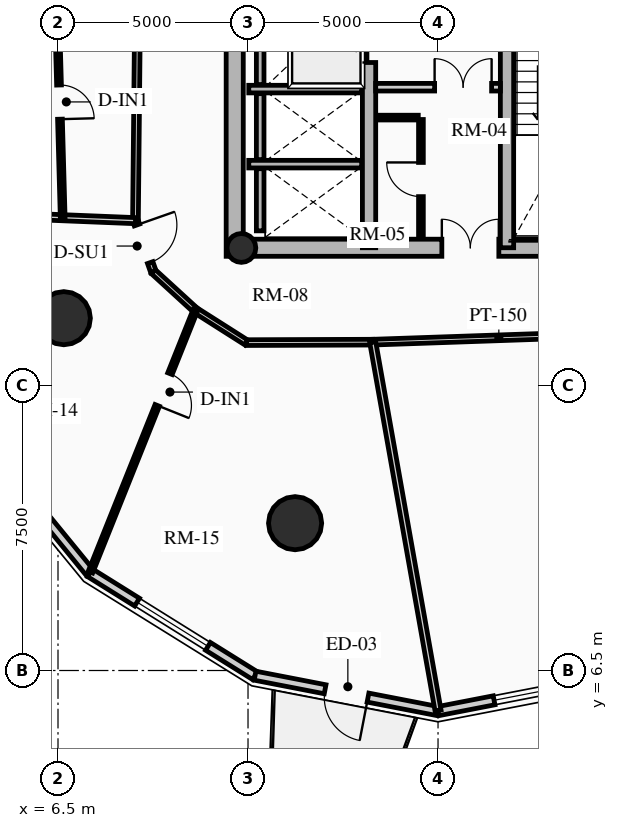
"""IFC4 building model, lengths in metres.
Left out: names, types, materials, properties, quantities, classifications, styles, units other than length and angle.
Written with IfcOpenShell. Run it as: python <this file> out.ifc"""

import sys

from ifc_helpers import new_model, si_unit, direction, frame, frame_2d, origin, origin_2d, place, context, subcontext, project, spatial, rectangle, circle, hollow_circle, extrude, source, transform, mapped, element, fill, save


model = new_model("IFC4")
c1 = context("Model", 3, precision=1e-05, world=origin(), true_north=direction((0.0, 1.0)))
c2 = subcontext(c1, "Body", "Model", "MODEL_VIEW")
j1 = project(units=[si_unit("LENGTHUNIT", "METRE"), si_unit("PLANEANGLEUNIT", "RADIAN")], contexts=[c1])
p1 = place(None, origin())
s1 = spatial("IfcSite", under=j1, at=p1, CompositionType="ELEMENT")
p2 = place(p1, origin())
s2 = spatial("IfcBuilding", under=s1, at=p2, CompositionType="ELEMENT")
p3 = place(p2, frame((0.0, 0.0, 119.62)))
s3 = spatial("IfcBuildingStorey", under=s2, at=p3, CompositionType="ELEMENT", Elevation=119.62)
p4 = place(p3, frame((11.15, 17.4, 0.0), z_axis=(0.0, 0.0, 1.0), x_axis=(0.0, 1.0, 0.0)))
e1 = element("IfcWall", 1, at=p4, inside=s3, PredefinedType="SHEAR", context=c2, shape_type="SweptSolid", body=[
    extrude(rectangle(XDim=14.2, YDim=0.45, at=frame_2d((7.1, 0.0))), origin(), (0.0, 0.0, 1.0), 2.91),
])
p5 = place(p3, frame((11.15, 17.625, 0.0), z_axis=(0.0, 0.0, 1.0), x_axis=(1.0, 0.0, 0.0)))
e2 = element("IfcWall", 2, at=p5, inside=s3, PredefinedType="SHEAR", context=c2, shape_type="SweptSolid", body=[
    extrude(rectangle(XDim=10.7, YDim=0.45, at=frame_2d((5.35, 0.0))), origin(), (0.0, 0.0, 1.0), 2.91),
])
m1 = source(origin(), c2, "Body", "SweptSolid", [
    extrude(rectangle(XDim=1.5, YDim=2.02, at=frame_2d((0.75, 1.01))), frame((0.0, 0.235, 0.0), z_axis=(0.0, -1.0, 0.0), x_axis=(1.0, 0.0, 0.0)), (0.0, 0.0, 1.0), 0.47),
])
p6 = place(p5, frame((5.45, 0.0, 0.0)))
e3 = element("IfcOpeningElement", 3, at=p6, cuts=e2, PredefinedType="OPENING", context=c2, shape_type="MappedRepresentation", body=[
    mapped(m1, transform((0.0, 0.0, 0.0), x_axis=(1.0, 0.0, 0.0), y_axis=(0.0, 1.0, 0.0), z_axis=(0.0, 0.0, 1.0), scale=1.0)),
])
p7 = place(p3, frame((14.685, 17.625, 0.0), z_axis=(0.0, 0.0, 1.0), x_axis=(0.0, 1.0, 0.0)))
e4 = element("IfcWall", 4, at=p7, inside=s3, PredefinedType="SHEAR", context=c2, shape_type="SweptSolid", body=[
    extrude(rectangle(XDim=13.75, YDim=0.35, at=frame_2d((6.875, 0.0))), origin(), (0.0, 0.0, 1.0), 2.91),
])
m2 = source(origin(), c2, "Body", "SweptSolid", [
    extrude(rectangle(XDim=1.1, YDim=2.015, at=frame_2d((0.55, 1.007))), frame((0.0, 0.185, 0.0), z_axis=(0.0, -1.0, 0.0), x_axis=(1.0, 0.0, 0.0)), (0.0, 0.0, 1.0), 0.37),
])
p8 = place(p7, frame((4.875, 0.0, 0.0)))
e5 = element("IfcOpeningElement", 5, at=p8, cuts=e4, PredefinedType="OPENING", context=c2, shape_type="MappedRepresentation", body=[
    mapped(m2, transform((0.0, 0.0, 0.0), x_axis=(1.0, 0.0, 0.0), y_axis=(0.0, 1.0, 0.0), z_axis=(0.0, 0.0, 1.0), scale=1.0)),
])
m3 = source(origin(), c2, "Body", "SweptSolid", [
    extrude(rectangle(XDim=1.15, YDim=2.02, at=frame_2d((0.575, 1.01))), frame((0.0, 0.185, 0.0), z_axis=(0.0, -1.0, 0.0), x_axis=(1.0, 0.0, 0.0)), (0.0, 0.0, 1.0), 0.37),
])
p9 = place(p7, frame((7.295, 0.0, 0.0)))
e6 = element("IfcOpeningElement", 6, at=p9, cuts=e4, PredefinedType="OPENING", context=c2, shape_type="MappedRepresentation", body=[
    mapped(m3, transform((0.0, 0.0, 0.0), x_axis=(1.0, 0.0, 0.0), y_axis=(0.0, 1.0, 0.0), z_axis=(0.0, 0.0, 1.0), scale=1.0)),
])
p10 = place(p3, frame((18.315, 17.625, 0.0), z_axis=(0.0, 0.0, 1.0), x_axis=(0.0, 1.0, 0.0)))
e7 = element("IfcWall", 7, at=p10, inside=s3, PredefinedType="SHEAR", context=c2, shape_type="SweptSolid", body=[
    extrude(rectangle(XDim=13.75, YDim=0.35, at=frame_2d((6.875, 0.0))), origin(), (0.0, 0.0, 1.0), 2.91),
])
p11 = place(p10, frame((10.0, 0.0, 0.0)))
e8 = element("IfcOpeningElement", 8, at=p11, cuts=e7, PredefinedType="OPENING", context=c2, shape_type="MappedRepresentation", body=[
    mapped(m2, transform((0.0, 0.0, 0.0), x_axis=(1.0, 0.0, 0.0), y_axis=(0.0, 1.0, 0.0), z_axis=(0.0, 0.0, 1.0), scale=1.0)),
])
p12 = place(p10, frame((12.0, 0.0, 0.0)))
e9 = element("IfcOpeningElement", 9, at=p12, cuts=e7, PredefinedType="OPENING", context=c2, shape_type="MappedRepresentation", body=[
    mapped(m2, transform((0.0, 0.0, 0.0), x_axis=(1.0, 0.0, 0.0), y_axis=(0.0, 1.0, 0.0), z_axis=(0.0, 0.0, 1.0), scale=1.0)),
])
p13 = place(p10, frame((5.305, 0.0, 0.0)))
e10 = element("IfcOpeningElement", 10, at=p13, cuts=e7, PredefinedType="OPENING", context=c2, shape_type="MappedRepresentation", body=[
    mapped(m3, transform((0.0, 0.0, 0.0), x_axis=(1.0, 0.0, 0.0), y_axis=(0.0, 1.0, 0.0), z_axis=(0.0, 0.0, 1.0), scale=1.0)),
])
p14 = place(p3, frame((11.325, 17.62, 0.0), z_axis=(0.0, 0.0, 1.0), x_axis=(1.0, 0.0, 0.0)))
e11 = element("IfcColumn", 11, at=p14, inside=s3, PredefinedType="COLUMN", context=c2, shape_type="SweptSolid", body=[
    extrude(hollow_circle(Radius=0.38, WallThickness=0.032, at=origin_2d()), origin(), (0.0, 0.0, 1.0), 2.91),
])
for number, where, z_axis, x_axis in (
    (12, (6.653, 15.771, 0.0), (0.0, 0.0, 1.0), (1.0, 0.0, 0.0)),
    (13, (12.739, 10.377, 0.0), (0.0, 0.0, 1.0), (1.0, 0.0, 0.0)),
):
    element("IfcColumn", number, at=place(p3, frame(where, z_axis=z_axis, x_axis=x_axis)), inside=s3, PredefinedType="USERDEFINED", context=c2, shape_type="SweptSolid", body=[
        extrude(circle(Radius=0.7, at=origin_2d()), origin(), (0.0, 0.0, 1.0), 2.91),
    ])
p15 = place(p3, frame((7.342, 9.072, 0.0), z_axis=(0.0, 0.0, 1.0), x_axis=(-0.632700781152, 0.77439635945, 0.0)))
e14 = element("IfcWall", 14, at=p15, inside=s3, PredefinedType="SOLIDWALL", context=c2, shape_type="SweptSolid", body=[
    extrude(rectangle(XDim=5.448, YDim=0.24, at=frame_2d((2.724, 0.0))), origin(), (0.0, 0.0, 1.0), 2.179),
])
p16 = place(p3, frame((11.685, 6.363, 0.0), z_axis=(0.0, 0.0, 1.0), x_axis=(-0.848520380187, 0.529162701263, 0.0)))
e15 = element("IfcWall", 15, at=p16, inside=s3, PredefinedType="SOLIDWALL", context=c2, shape_type="SweptSolid", body=[
    extrude(rectangle(XDim=5.119, YDim=0.24, at=frame_2d((2.56, 0.0))), origin(), (0.0, 0.0, 1.0), 2.179),
])
m4 = source(origin(), c2, "Body", "SweptSolid", [
    extrude(rectangle(XDim=2.2, YDim=1.35, at=frame_2d((1.1, 0.675))), frame((0.0, 0.13, 0.0), z_axis=(0.0, -1.0, 0.0), x_axis=(1.0, 0.0, 0.0)), (0.0, 0.0, 1.0), 0.26),
])
p17 = place(p16, frame((1.459, 0.0, 0.65)))
e16 = element("IfcOpeningElement", 16, at=p17, cuts=e15, PredefinedType="OPENING", context=c2, shape_type="MappedRepresentation", body=[
    mapped(m4, transform((0.0, 0.0, 0.0), x_axis=(1.0, 0.0, 0.0), y_axis=(0.0, 1.0, 0.0), z_axis=(0.0, 0.0, 1.0), scale=1.0)),
])
p18 = place(p3, frame((16.5, 5.43, 0.0), z_axis=(0.0, 0.0, 1.0), x_axis=(-0.981723785992, 0.190311344954, 0.0)))
e17 = element("IfcWall", 17, at=p18, inside=s3, PredefinedType="SOLIDWALL", context=c2, shape_type="SweptSolid", body=[
    extrude(rectangle(XDim=4.904, YDim=0.24, at=frame_2d((2.452, 0.0))), origin(), (0.0, 0.0, 1.0), 2.179),
])
m5 = source(origin(), c2, "Body", "SweptSolid", [
    extrude(rectangle(XDim=1.15, YDim=2.005, at=frame_2d((0.575, 1.002))), frame((0.0, 0.13, 0.0), z_axis=(0.0, -1.0, 0.0), x_axis=(1.0, 0.0, 0.0)), (0.0, 0.0, 1.0), 0.26),
])
p19 = place(p18, frame((1.877, 0.0, 0.0)))
e18 = element("IfcOpeningElement", 18, at=p19, cuts=e17, PredefinedType="OPENING", context=c2, shape_type="MappedRepresentation", body=[
    mapped(m5, transform((0.0, 0.0, 0.0), x_axis=(1.0, 0.0, 0.0), y_axis=(0.0, 1.0, 0.0), z_axis=(0.0, 0.0, 1.0), scale=1.0)),
])
p20 = place(p3, frame((21.315, 6.363, 0.0), z_axis=(0.0, 0.0, 1.0), x_axis=(-0.981723785992, -0.190311344954, 0.0)))
e19 = element("IfcWall", 19, at=p20, inside=s3, PredefinedType="SOLIDWALL", context=c2, shape_type="SweptSolid", body=[
    extrude(rectangle(XDim=4.904, YDim=0.24, at=frame_2d((2.452, 0.0))), origin(), (0.0, 0.0, 1.0), 2.179),
])
m6 = source(origin(), c2, "Body", "SweptSolid", [
    extrude(rectangle(XDim=1.9, YDim=1.35, at=frame_2d((0.95, 0.675))), frame((0.0, 0.13, 0.0), z_axis=(0.0, -1.0, 0.0), x_axis=(1.0, 0.0, 0.0)), (0.0, 0.0, 1.0), 0.26),
])
p21 = place(p20, frame((1.502, 0.0, 0.65)))
e20 = element("IfcOpeningElement", 20, at=p21, cuts=e19, PredefinedType="OPENING", context=c2, shape_type="MappedRepresentation", body=[
    mapped(m6, transform((0.0, 0.0, 0.0), x_axis=(1.0, 0.0, 0.0), y_axis=(0.0, 1.0, 0.0), z_axis=(0.0, 0.0, 1.0), scale=1.0)),
])
p22 = place(p3, frame((11.52, 21.8, 0.0), z_axis=(0.0, 0.0, 1.0), x_axis=(1.0, 0.0, 0.0)))
e21 = element("IfcWall", 21, at=p22, inside=s3, PredefinedType="SHEAR", context=c2, shape_type="SweptSolid", body=[
    extrude(rectangle(XDim=2.97, YDim=0.2, at=frame_2d((1.485, 0.0))), origin(), (0.0, 0.0, 1.0), 2.91),
])
p23 = place(p3, frame((11.82, 21.92, 0.0), z_axis=(0.0, 0.0, 1.0), x_axis=(0.0, 1.0, 0.0)))
e22 = element("IfcWall", 22, at=p23, inside=s3, PredefinedType="SHEAR", context=c2, shape_type="SweptSolid", body=[
    extrude(rectangle(XDim=2.44, YDim=0.2, at=frame_2d((1.22, 0.0))), origin(), (0.0, 0.0, 1.0), 2.91),
])
p24 = place(p3, frame((11.52, 19.825, 0.0), z_axis=(0.0, 0.0, 1.0), x_axis=(1.0, 0.0, 0.0)))
e23 = element("IfcWall", 23, at=p24, inside=s3, PredefinedType="SHEAR", context=c2, shape_type="SweptSolid", body=[
    extrude(rectangle(XDim=2.97, YDim=0.2, at=frame_2d((1.485, 0.0))), origin(), (0.0, 0.0, 1.0), 2.91),
])
p25 = place(p3, frame((11.82, 19.945, 0.0), z_axis=(0.0, 0.0, 1.0), x_axis=(0.0, 1.0, 0.0)))
e24 = element("IfcWall", 24, at=p25, inside=s3, PredefinedType="SHEAR", context=c2, shape_type="SweptSolid", body=[
    extrude(rectangle(XDim=1.735, YDim=0.2, at=frame_2d((0.867, 0.0))), origin(), (0.0, 0.0, 1.0), 2.91),
])
p26 = place(p3, frame((11.82, 18.07, 0.0), z_axis=(0.0, 0.0, 1.0), x_axis=(0.0, 1.0, 0.0)))
e25 = element("IfcWall", 25, at=p26, inside=s3, PredefinedType="SHEAR", context=c2, shape_type="SweptSolid", body=[
    extrude(rectangle(XDim=1.635, YDim=0.2, at=frame_2d((0.817, 0.0))), origin(), (0.0, 0.0, 1.0), 2.91),
])
p27 = place(p3, frame((14.86, 21.85, 0.0), z_axis=(0.0, 0.0, 1.0), x_axis=(1.0, 0.0, 0.0)))
e26 = element("IfcWall", 26, at=p27, inside=s3, PredefinedType="PARTITIONING", context=c2, shape_type="SweptSolid", body=[
    extrude(rectangle(XDim=3.28, YDim=0.2, at=frame_2d((1.64, 0.0))), origin(), (0.0, 0.0, 1.0), 2.655),
])
m7 = source(origin(), c2, "Body", "SweptSolid", [
    extrude(rectangle(XDim=1.5, YDim=2.02, at=frame_2d((0.75, 1.01))), frame((0.0, 0.11, 0.0), z_axis=(0.0, -1.0, 0.0), x_axis=(1.0, 0.0, 0.0)), (0.0, 0.0, 1.0), 0.22),
])
p28 = place(p27, frame((1.55, 0.0, 0.0)))
e27 = element("IfcOpeningElement", 27, at=p28, cuts=e26, PredefinedType="OPENING", context=c2, shape_type="MappedRepresentation", body=[
    mapped(m7, transform((0.0, 0.0, 0.0), x_axis=(1.0, 0.0, 0.0), y_axis=(0.0, 1.0, 0.0), z_axis=(0.0, 0.0, 1.0), scale=1.0)),
])
p29 = place(p3, frame((16.05, 17.92, 0.0), z_axis=(0.0, 0.0, 1.0), x_axis=(0.0, 1.0, 0.0)))
e28 = element("IfcWall", 28, at=p29, inside=s3, PredefinedType="PARTITIONING", context=c2, shape_type="SweptSolid", body=[
    extrude(rectangle(XDim=3.08, YDim=0.125, at=frame_2d((1.54, 0.0))), origin(), (0.0, 0.0, 1.0), 2.655),
])
m8 = source(origin(), c2, "Body", "SweptSolid", [
    extrude(rectangle(XDim=0.9, YDim=2.005, at=frame_2d((0.45, 1.002))), frame((0.0, 0.073, 0.0), z_axis=(0.0, -1.0, 0.0), x_axis=(1.0, 0.0, 0.0)), (0.0, 0.0, 1.0), 0.145),
])
p30 = place(p29, frame((1.05, 0.0, 0.0)))
e29 = element("IfcOpeningElement", 29, at=p30, cuts=e28, PredefinedType="OPENING", context=c2, shape_type="MappedRepresentation", body=[
    mapped(m8, transform((0.0, 0.0, 0.0), x_axis=(1.0, 0.0, 0.0), y_axis=(0.0, 1.0, 0.0), z_axis=(0.0, 0.0, 1.0), scale=1.0)),
])
p31 = place(p3, frame((14.88, 21.05, 0.0), z_axis=(0.0, 0.0, 1.0), x_axis=(1.0, 0.0, 0.0)))
e30 = element("IfcWall", 30, at=p31, inside=s3, PredefinedType="PARTITIONING", context=c2, shape_type="SweptSolid", body=[
    extrude(rectangle(XDim=1.1, YDim=0.125, at=frame_2d((0.55, 0.0))), origin(), (0.0, 0.0, 1.0), 2.655),
])
p32 = place(p3, frame((8.6, 24.5, 0.0), z_axis=(0.0, 0.0, 1.0), x_axis=(-0.010023665349, -0.999949761805, 0.0)))
e31 = element("IfcWall", 31, at=p32, inside=s3, PredefinedType="PARTITIONING", context=c2, shape_type="SweptSolid", body=[
    extrude(rectangle(XDim=6.162, YDim=0.15, at=frame_2d((3.081, 0.0))), origin(), (0.0, 0.0, 1.0), 2.225),
])
p33 = place(p3, frame((8.538, 18.338, 0.0), z_axis=(0.0, 0.0, 1.0), x_axis=(0.331358150167, -0.94350504838, 0.0)))
e32 = element("IfcWall", 32, at=p33, inside=s3, PredefinedType="PARTITIONING", context=c2, shape_type="SweptSolid", body=[
    extrude(rectangle(XDim=1.424, YDim=0.15, at=frame_2d((0.712, 0.0))), origin(), (0.0, 0.0, 1.0), 2.225),
])
m9 = source(origin(), c2, "Body", "SweptSolid", [
    extrude(rectangle(XDim=1.05, YDim=2.015, at=frame_2d((0.525, 1.007))), frame((0.0, 0.085, 0.0), z_axis=(0.0, -1.0, 0.0), x_axis=(1.0, 0.0, 0.0)), (0.0, 0.0, 1.0), 0.17),
])
p34 = place(p33, frame((0.12, 0.0, 0.0)))
e33 = element("IfcOpeningElement", 33, at=p34, cuts=e32, PredefinedType="OPENING", context=c2, shape_type="MappedRepresentation", body=[
    mapped(m9, transform((0.0, 0.0, 0.0), x_axis=(1.0, 0.0, 0.0), y_axis=(0.0, 1.0, 0.0), z_axis=(0.0, 0.0, 1.0), scale=1.0)),
])
p35 = place(p3, frame((9.01, 16.994, 0.0), z_axis=(0.0, 0.0, 1.0), x_axis=(0.737701798986, -0.67512669609, 0.0)))
e34 = element("IfcWall", 34, at=p35, inside=s3, PredefinedType="PARTITIONING", context=c2, shape_type="SweptSolid", body=[
    extrude(rectangle(XDim=1.498, YDim=0.15, at=frame_2d((0.749, 0.0))), origin(), (0.0, 0.0, 1.0), 2.225),
])
p36 = place(p3, frame((10.115, 15.983, 0.0), z_axis=(0.0, 0.0, 1.0), x_axis=(0.843995849351, -0.536349705209, 0.0)))
e35 = element("IfcWall", 35, at=p36, inside=s3, PredefinedType="PARTITIONING", context=c2, shape_type="SweptSolid", body=[
    extrude(rectangle(XDim=1.593, YDim=0.15, at=frame_2d((0.796, 0.0))), origin(), (0.0, 0.0, 1.0), 2.225),
])
p37 = place(p3, frame((11.46, 15.129, 0.0), z_axis=(0.0, 0.0, 1.0), x_axis=(0.999993513287, 0.003601858435, 0.0)))
e36 = element("IfcWall", 36, at=p37, inside=s3, PredefinedType="PARTITIONING", context=c2, shape_type="SweptSolid", body=[
    extrude(rectangle(XDim=3.321, YDim=0.15, at=frame_2d((1.661, 0.0))), origin(), (0.0, 0.0, 1.0), 2.225),
])
p38 = place(p3, frame((14.781, 15.141, 0.0), z_axis=(0.0, 0.0, 1.0), x_axis=(0.999407918707, 0.034406569513, 0.0)))
e37 = element("IfcWall", 37, at=p38, inside=s3, PredefinedType="PARTITIONING", context=c2, shape_type="SweptSolid", body=[
    extrude(rectangle(XDim=6.642, YDim=0.15, at=frame_2d((3.321, 0.0))), origin(), (0.0, 0.0, 1.0), 2.225),
])
p39 = place(p3, frame((8.538, 18.338, 0.0), z_axis=(0.0, 0.0, 1.0), x_axis=(-0.999191355531, 0.04020740021, 0.0)))
e38 = element("IfcWall", 38, at=p39, inside=s3, PredefinedType="PARTITIONING", context=c2, shape_type="SweptSolid", body=[
    extrude(rectangle(XDim=6.843, YDim=0.16, at=frame_2d((3.422, 0.0))), origin(), (0.0, 0.0, 1.0), 2.179),
])
p40 = place(p3, frame((14.781, 15.141, 0.0), z_axis=(0.0, 0.0, 1.0), x_axis=(0.174659805548, -0.984628839881, 0.0)))
e39 = element("IfcWall", 39, at=p40, inside=s3, PredefinedType="PARTITIONING", context=c2, shape_type="SweptSolid", body=[
    extrude(rectangle(XDim=9.842, YDim=0.16, at=frame_2d((4.921, 0.0))), origin(), (0.0, 0.0, 1.0), 2.179),
])
p41 = place(p3, frame((6.455, 24.5, 0.0), z_axis=(0.0, 0.0, 1.0), x_axis=(0.027753708707, -0.999614791634, 0.0)))
e40 = element("IfcWall", 40, at=p41, inside=s3, PredefinedType="PARTITIONING", context=c2, shape_type="SweptSolid", body=[
    extrude(rectangle(XDim=6.087, YDim=0.125, at=frame_2d((3.044, 0.0))), origin(), (0.0, 0.0, 1.0), 2.225),
])
p42 = place(p41, frame((2.594, 0.0, 0.0)))
e41 = element("IfcOpeningElement", 41, at=p42, cuts=e40, PredefinedType="OPENING", context=c2, shape_type="MappedRepresentation", body=[
    mapped(m8, transform((0.0, 0.0, 0.0), x_axis=(1.0, 0.0, 0.0), y_axis=(0.0, 1.0, 0.0), z_axis=(0.0, 0.0, 1.0), scale=1.0)),
])
p43 = place(p3, frame((10.115, 15.983, 0.0), z_axis=(0.0, 0.0, 1.0), x_axis=(-0.371861013147, -0.928288417951, 0.0)))
e42 = element("IfcWall", 42, at=p43, inside=s3, PredefinedType="PARTITIONING", context=c2, shape_type="SweptSolid", body=[
    extrude(rectangle(XDim=7.427, YDim=0.125, at=frame_2d((3.714, 0.0))), origin(), (0.0, 0.0, 1.0), 2.179),
])
p44 = place(p43, frame((1.8, 0.0, 0.0)))
e43 = element("IfcOpeningElement", 43, at=p44, cuts=e42, PredefinedType="OPENING", context=c2, shape_type="MappedRepresentation", body=[
    mapped(m8, transform((0.0, 0.0, 0.0), x_axis=(1.0, 0.0, 0.0), y_axis=(0.0, 1.0, 0.0), z_axis=(0.0, 0.0, 1.0), scale=1.0)),
])
m10 = source(origin(), c2, "Body", "SweptSolid", [
    extrude(rectangle(XDim=2.2, YDim=1.35, at=frame_2d((1.1, 0.675))), frame((0.0, 0.03, 0.0), z_axis=(0.0, -1.0, 0.0), x_axis=(1.0, 0.0, 0.0)), (0.0, 0.0, 1.0), 0.06),
])
p45 = place(p17, origin())
e44 = element("IfcWindow", 44, at=p45, inside=s3, PartitioningType="DOUBLE_PANEL_VERTICAL", PredefinedType="WINDOW", context=c2, shape_type="MappedRepresentation", body=[
    mapped(m10, transform((0.0, 0.0, 0.0), x_axis=(1.0, 0.0, 0.0), y_axis=(0.0, 1.0, 0.0), z_axis=(0.0, 0.0, 1.0), scale=1.0)),
])
fill(e16, e44)
m11 = source(origin(), c2, "Body", "SweptSolid", [
    extrude(rectangle(XDim=1.15, YDim=2.005, at=frame_2d((0.575, 1.002))), frame((0.0, 0.025, 0.0), z_axis=(0.0, -1.0, 0.0), x_axis=(1.0, 0.0, 0.0)), (0.0, 0.0, 1.0), 0.05),
])
p46 = place(p19, origin())
e45 = element("IfcDoor", 45, at=p46, inside=s3, OperationType="SINGLE_SWING_LEFT", PredefinedType="DOOR", context=c2, shape_type="MappedRepresentation", body=[
    mapped(m11, transform((0.0, 0.0, 0.0), x_axis=(1.0, 0.0, 0.0), y_axis=(0.0, 1.0, 0.0), z_axis=(0.0, 0.0, 1.0), scale=1.0)),
])
fill(e18, e45)
m12 = source(origin(), c2, "Body", "SweptSolid", [
    extrude(rectangle(XDim=1.9, YDim=1.35, at=frame_2d((0.95, 0.675))), frame((0.0, 0.03, 0.0), z_axis=(0.0, -1.0, 0.0), x_axis=(1.0, 0.0, 0.0)), (0.0, 0.0, 1.0), 0.06),
])
p47 = place(p21, origin())
e46 = element("IfcWindow", 46, at=p47, inside=s3, PartitioningType="DOUBLE_PANEL_VERTICAL", PredefinedType="WINDOW", context=c2, shape_type="MappedRepresentation", body=[
    mapped(m12, transform((0.0, 0.0, 0.0), x_axis=(1.0, 0.0, 0.0), y_axis=(0.0, 1.0, 0.0), z_axis=(0.0, 0.0, 1.0), scale=1.0)),
])
fill(e20, e46)
m13 = source(origin(), c2, "Body", "SweptSolid", [
    extrude(rectangle(XDim=1.1, YDim=2.015, at=frame_2d((0.55, 1.007))), frame((0.0, 0.025, 0.0), z_axis=(0.0, -1.0, 0.0), x_axis=(1.0, 0.0, 0.0)), (0.0, 0.0, 1.0), 0.05),
])
p48 = place(p8, origin())
e47 = element("IfcDoor", 47, at=p48, inside=s3, OperationType="SLIDING_TO_LEFT", PredefinedType="DOOR", context=c2, shape_type="MappedRepresentation", body=[
    mapped(m13, transform((0.0, 0.0, 0.0), x_axis=(1.0, 0.0, 0.0), y_axis=(0.0, 1.0, 0.0), z_axis=(0.0, 0.0, 1.0), scale=1.0)),
])
fill(e5, e47)
m14 = source(origin(), c2, "Body", "SweptSolid", [
    extrude(rectangle(XDim=1.5, YDim=2.02, at=frame_2d((0.75, 1.01))), frame((0.0, 0.025, 0.0), z_axis=(0.0, -1.0, 0.0), x_axis=(1.0, 0.0, 0.0)), (0.0, 0.0, 1.0), 0.05),
])
p49 = place(p6, origin())
e48 = element("IfcDoor", 48, at=p49, inside=s3, OperationType="DOUBLE_DOOR_SINGLE_SWING", PredefinedType="DOOR", context=c2, shape_type="MappedRepresentation", body=[
    mapped(m14, transform((0.0, 0.0, 0.0), x_axis=(1.0, 0.0, 0.0), y_axis=(0.0, 1.0, 0.0), z_axis=(0.0, 0.0, 1.0), scale=1.0)),
])
fill(e3, e48)
p50 = place(p28, origin())
e49 = element("IfcDoor", 49, at=p50, inside=s3, OperationType="DOUBLE_DOOR_SINGLE_SWING", PredefinedType="DOOR", context=c2, shape_type="MappedRepresentation", body=[
    mapped(m14, transform((0.0, 0.0, 0.0), x_axis=(1.0, 0.0, 0.0), y_axis=(0.0, 1.0, 0.0), z_axis=(0.0, 0.0, 1.0), scale=1.0)),
])
fill(e27, e49)
m15 = source(origin(), c2, "Body", "SweptSolid", [
    extrude(rectangle(XDim=0.9, YDim=2.005, at=frame_2d((0.45, 1.002))), frame((0.0, 0.025, 0.0), z_axis=(0.0, -1.0, 0.0), x_axis=(1.0, 0.0, 0.0)), (0.0, 0.0, 1.0), 0.05),
])
p51 = place(p30, origin())
e50 = element("IfcDoor", 50, at=p51, inside=s3, OperationType="SINGLE_SWING_RIGHT", PredefinedType="DOOR", context=c2, shape_type="MappedRepresentation", body=[
    mapped(m15, transform((0.0, 0.0, 0.0), x_axis=(1.0, 0.0, 0.0), y_axis=(0.0, 1.0, 0.0), z_axis=(0.0, 0.0, 1.0), scale=1.0)),
])
fill(e29, e50)
p52 = place(p42, origin())
e51 = element("IfcDoor", 51, at=p52, inside=s3, OperationType="SINGLE_SWING_RIGHT", PredefinedType="DOOR", context=c2, shape_type="MappedRepresentation", body=[
    mapped(m15, transform((0.0, 0.0, 0.0), x_axis=(1.0, 0.0, 0.0), y_axis=(0.0, 1.0, 0.0), z_axis=(0.0, 0.0, 1.0), scale=1.0)),
])
fill(e41, e51)
m16 = source(origin(), c2, "Body", "SweptSolid", [
    extrude(rectangle(XDim=1.05, YDim=2.015, at=frame_2d((0.525, 1.007))), frame((0.0, 0.025, 0.0), z_axis=(0.0, -1.0, 0.0), x_axis=(1.0, 0.0, 0.0)), (0.0, 0.0, 1.0), 0.05),
])
p53 = place(p34, origin())
e52 = element("IfcDoor", 52, at=p53, inside=s3, OperationType="SINGLE_SWING_LEFT", PredefinedType="DOOR", context=c2, shape_type="MappedRepresentation", body=[
    mapped(m16, transform((0.0, 0.0, 0.0), x_axis=(1.0, 0.0, 0.0), y_axis=(0.0, 1.0, 0.0), z_axis=(0.0, 0.0, 1.0), scale=1.0)),
])
fill(e33, e52)
p54 = place(p44, origin())
e53 = element("IfcDoor", 53, at=p54, inside=s3, OperationType="SINGLE_SWING_RIGHT", PredefinedType="DOOR", context=c2, shape_type="MappedRepresentation", body=[
    mapped(m15, transform((0.0, 0.0, 0.0), x_axis=(1.0, 0.0, 0.0), y_axis=(0.0, 1.0, 0.0), z_axis=(0.0, 0.0, 1.0), scale=1.0)),
])
fill(e43, e53)
save(model, sys.argv[1])
